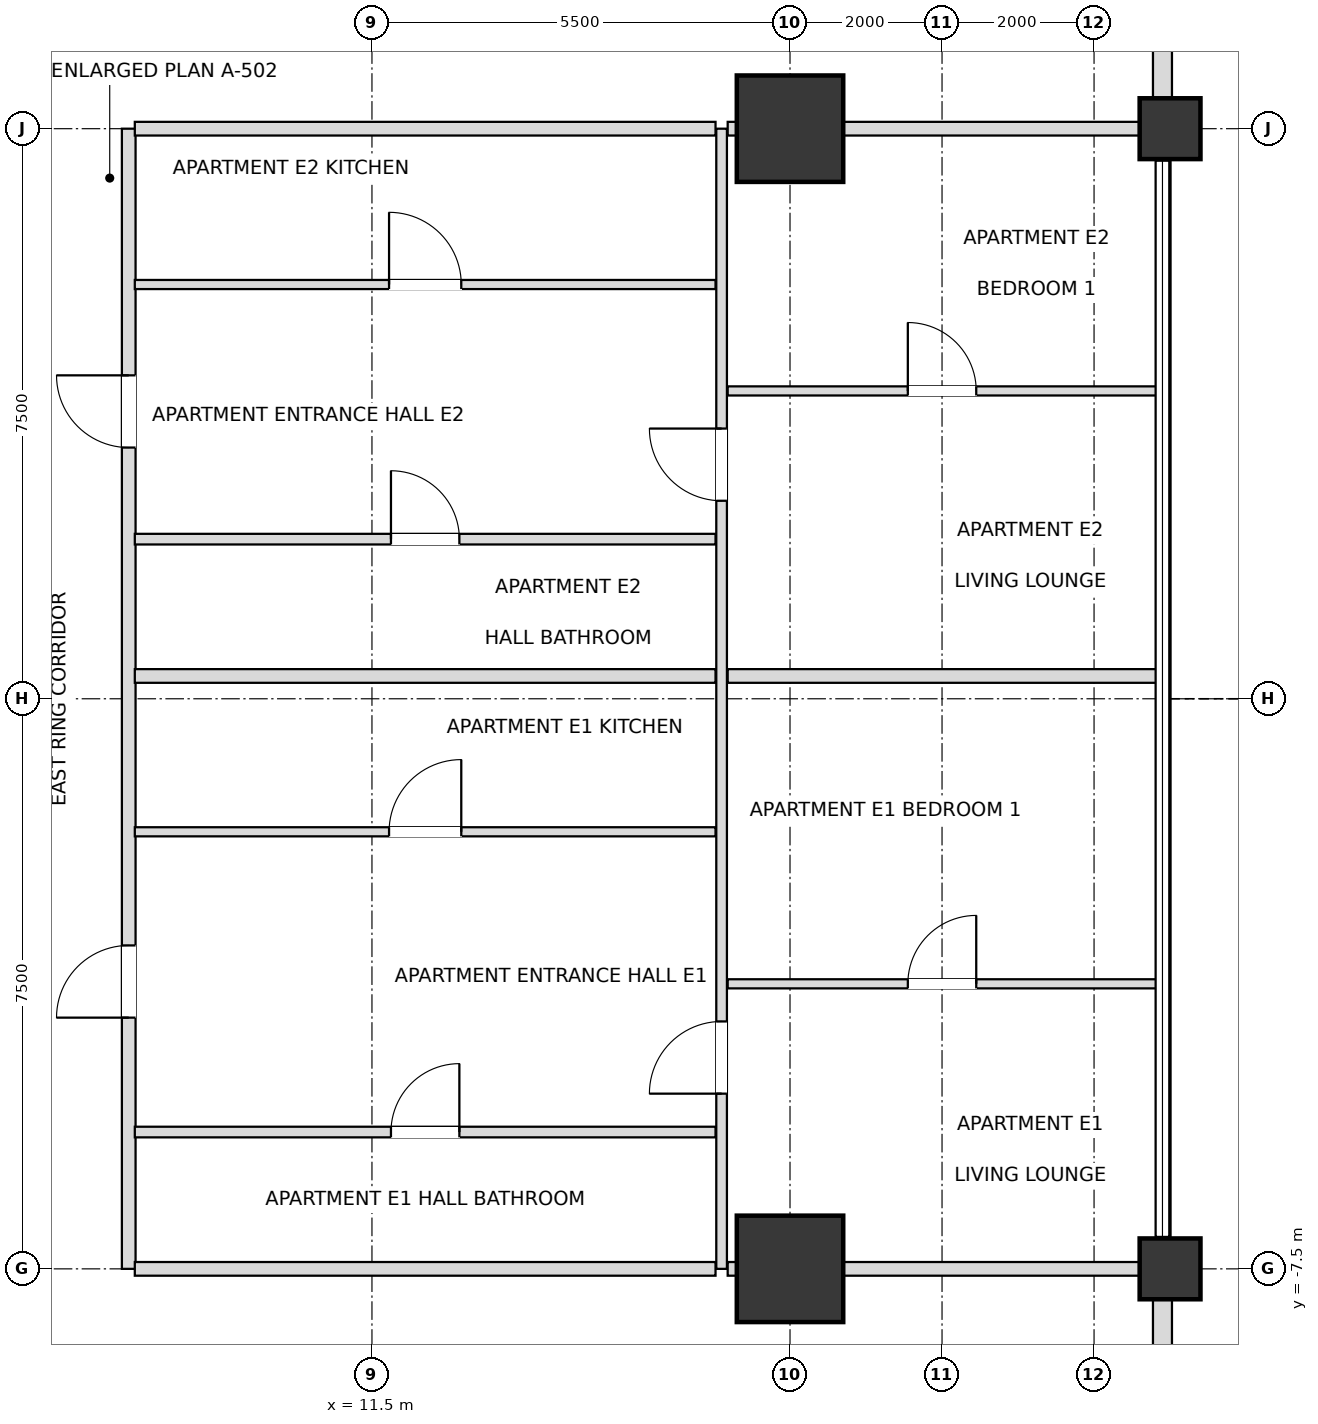
"""IFC4 building model, lengths in metres.
Left out: names, types, materials, properties, quantities, classifications, styles, units other than length and angle.
Written with IfcOpenShell. Run it as: python <this file> out.ifc"""

import sys

from ifc_helpers import new_model, si_unit, direction, frame, frame_2d, origin, origin_2d, place, context, subcontext, project, spatial, rectangle, extrude, element, fill, save


model = new_model("IFC4")
c1 = context("Model", 3, precision=1e-05, world=origin(), true_north=direction((0.0, 1.0)))
c2 = subcontext(c1, "Body", "Model", "MODEL_VIEW")
j1 = project(units=[si_unit("LENGTHUNIT", "METRE"), si_unit("PLANEANGLEUNIT", "RADIAN")], contexts=[c1])
p1 = place(None, origin())
s1 = spatial("IfcSite", under=j1, at=p1, CompositionType="ELEMENT")
p2 = place(p1, origin())
s2 = spatial("IfcBuilding", under=s1, at=p2, CompositionType="ELEMENT")
p3 = place(p2, frame((0.0, 0.0, 72.0)))
s3 = spatial("IfcBuildingStorey", under=s2, at=p3, CompositionType="ELEMENT", Elevation=72.0)
for number, where, z_axis, x_axis in (
    (1, (17.0, -7.5, 0.0), (0.0, 0.0, 1.0), (1.0, 0.0, 0.0)),
    (2, (17.0, 7.5, 0.0), (0.0, 0.0, 1.0), (1.0, 0.0, 0.0)),
):
    element("IfcColumn", number, at=place(p3, frame(where, z_axis=z_axis, x_axis=x_axis)), inside=s3, PredefinedType="USERDEFINED", context=c2, shape_type="SweptSolid", body=[
        extrude(rectangle(XDim=1.4, YDim=1.4, at=origin_2d()), origin(), (0.0, 0.0, 1.0), 3.6),
    ])
for number, where, z_axis, x_axis in (
    (3, (22.0, -7.5, 0.0), (0.0, 0.0, 1.0), (1.0, 0.0, 0.0)),
    (4, (22.0, 7.5, 0.0), (0.0, 0.0, 1.0), (1.0, 0.0, 0.0)),
):
    element("IfcColumn", number, at=place(p3, frame(where, z_axis=z_axis, x_axis=x_axis)), inside=s3, PredefinedType="COLUMN", context=c2, shape_type="SweptSolid", body=[
        extrude(rectangle(XDim=0.8, YDim=0.8, at=origin_2d()), origin(), (0.0, 0.0, 1.0), 3.6),
    ])
p4 = place(p3, frame((21.9, -12.605, 0.0), z_axis=(0.0, 0.0, 1.0), x_axis=(0.0, 1.0, 0.0)))
e5 = element("IfcWall", 5, at=p4, inside=s3, PredefinedType="SOLIDWALL", context=c2, shape_type="SweptSolid", body=[
    extrude(rectangle(XDim=4.71, YDim=0.25, at=frame_2d((2.355, 0.0))), origin(), (0.0, 0.0, 1.0), 2.736),
])
p5 = place(p4, frame((1.455, 0.0, 0.72)))
e6 = element("IfcOpeningElement", 6, at=p5, cuts=e5, PredefinedType="OPENING", context=c2, shape_type="SweptSolid", body=[
    extrude(rectangle(XDim=1.8, YDim=1.68, at=frame_2d((0.9, 0.84))), frame((0.0, 0.135, 0.0), z_axis=(0.0, -1.0, 0.0), x_axis=(1.0, 0.0, 0.0)), (0.0, 0.0, 1.0), 0.27),
])
p6 = place(p3, frame((21.9, 7.895, 0.0), z_axis=(0.0, 0.0, 1.0), x_axis=(0.0, 1.0, 0.0)))
e7 = element("IfcWall", 7, at=p6, inside=s3, PredefinedType="SOLIDWALL", context=c2, shape_type="SweptSolid", body=[
    extrude(rectangle(XDim=4.71, YDim=0.25, at=frame_2d((2.355, 0.0))), origin(), (0.0, 0.0, 1.0), 2.736),
])
p7 = place(p6, frame((1.455, 0.0, 0.72)))
e8 = element("IfcOpeningElement", 8, at=p7, cuts=e7, PredefinedType="OPENING", context=c2, shape_type="SweptSolid", body=[
    extrude(rectangle(XDim=1.8, YDim=1.68, at=frame_2d((0.9, 0.84))), frame((0.0, 0.135, 0.0), z_axis=(0.0, -1.0, 0.0), x_axis=(1.0, 0.0, 0.0)), (0.0, 0.0, 1.0), 0.27),
])
p8 = place(p3, frame((8.3, -7.5, 0.0), z_axis=(0.0, 0.0, 1.0), x_axis=(0.0, 1.0, 0.0)))
e9 = element("IfcWall", 9, at=p8, inside=s3, PredefinedType="PARTITIONING", context=c2, shape_type="SweptSolid", body=[
    extrude(rectangle(XDim=15.0, YDim=0.18, at=frame_2d((7.5, 0.0))), origin(), (0.0, 0.0, 1.0), 3.38),
])
p9 = place(p8, frame((3.305, 0.0, 0.0)))
e10 = element("IfcOpeningElement", 10, at=p9, cuts=e9, PredefinedType="OPENING", context=c2, shape_type="SweptSolid", body=[
    extrude(rectangle(XDim=0.95, YDim=2.15, at=frame_2d((0.475, 1.075))), frame((0.0, 0.1, 0.0), z_axis=(0.0, -1.0, 0.0), x_axis=(1.0, 0.0, 0.0)), (0.0, 0.0, 1.0), 0.2),
])
p10 = place(p8, frame((10.805, 0.0, 0.0)))
e11 = element("IfcOpeningElement", 11, at=p10, cuts=e9, PredefinedType="OPENING", context=c2, shape_type="SweptSolid", body=[
    extrude(rectangle(XDim=0.95, YDim=2.15, at=frame_2d((0.475, 1.075))), frame((0.0, 0.1, 0.0), z_axis=(0.0, -1.0, 0.0), x_axis=(1.0, 0.0, 0.0)), (0.0, 0.0, 1.0), 0.2),
])
p11 = place(p3, frame((16.1, -7.5, 0.0), z_axis=(0.0, 0.0, 1.0), x_axis=(0.0, 1.0, 0.0)))
e12 = element("IfcWall", 12, at=p11, inside=s3, PredefinedType="PARTITIONING", context=c2, shape_type="SweptSolid", body=[
    extrude(rectangle(XDim=15.0, YDim=0.14, at=frame_2d((7.5, 0.0))), origin(), (0.0, 0.0, 1.0), 3.38),
])
p12 = place(p11, frame((2.305, 0.0, 0.0)))
e13 = element("IfcOpeningElement", 13, at=p12, cuts=e12, PredefinedType="OPENING", context=c2, shape_type="SweptSolid", body=[
    extrude(rectangle(XDim=0.95, YDim=2.1, at=frame_2d((0.475, 1.05))), frame((0.0, 0.08, 0.0), z_axis=(0.0, -1.0, 0.0), x_axis=(1.0, 0.0, 0.0)), (0.0, 0.0, 1.0), 0.16),
])
p13 = place(p11, frame((10.105, 0.0, 0.0)))
e14 = element("IfcOpeningElement", 14, at=p13, cuts=e12, PredefinedType="OPENING", context=c2, shape_type="SweptSolid", body=[
    extrude(rectangle(XDim=0.95, YDim=2.1, at=frame_2d((0.475, 1.05))), frame((0.0, 0.08, 0.0), z_axis=(0.0, -1.0, 0.0), x_axis=(1.0, 0.0, 0.0)), (0.0, 0.0, 1.0), 0.16),
])
p14 = place(p3, frame((8.38, -7.5, 0.0), z_axis=(0.0, 0.0, 1.0), x_axis=(1.0, 0.0, 0.0)))
e15 = element("IfcWall", 15, at=p14, inside=s3, PredefinedType="PARTITIONING", context=c2, shape_type="SweptSolid", body=[
    extrude(rectangle(XDim=7.64, YDim=0.18, at=frame_2d((3.82, 0.0))), origin(), (0.0, 0.0, 1.0), 2.816),
])
p15 = place(p3, frame((16.18, -7.5, 0.0), z_axis=(0.0, 0.0, 1.0), x_axis=(1.0, 0.0, 0.0)))
e16 = element("IfcWall", 16, at=p15, inside=s3, PredefinedType="PARTITIONING", context=c2, shape_type="SweptSolid", body=[
    extrude(rectangle(XDim=5.72, YDim=0.18, at=frame_2d((2.86, 0.0))), origin(), (0.0, 0.0, 1.0), 2.816),
])
p16 = place(p3, frame((8.38, -5.7, 0.0), z_axis=(0.0, 0.0, 1.0), x_axis=(1.0, 0.0, 0.0)))
e17 = element("IfcWall", 17, at=p16, inside=s3, PredefinedType="PARTITIONING", context=c2, shape_type="SweptSolid", body=[
    extrude(rectangle(XDim=7.64, YDim=0.14, at=frame_2d((3.82, 0.0))), origin(), (0.0, 0.0, 1.0), 2.948),
])
p17 = place(p16, frame((3.37, 0.0, 0.0)))
e18 = element("IfcOpeningElement", 18, at=p17, cuts=e17, PredefinedType="OPENING", context=c2, shape_type="SweptSolid", body=[
    extrude(rectangle(XDim=0.9, YDim=2.1, at=frame_2d((0.45, 1.05))), frame((0.0, 0.08, 0.0), z_axis=(0.0, -1.0, 0.0), x_axis=(1.0, 0.0, 0.0)), (0.0, 0.0, 1.0), 0.16),
])
p18 = place(p3, frame((16.18, -3.75, 0.0), z_axis=(0.0, 0.0, 1.0), x_axis=(1.0, 0.0, 0.0)))
e19 = element("IfcWall", 19, at=p18, inside=s3, PredefinedType="PARTITIONING", context=c2, shape_type="SweptSolid", body=[
    extrude(rectangle(XDim=5.64, YDim=0.12, at=frame_2d((2.82, 0.0))), origin(), (0.0, 0.0, 1.0), 2.816),
])
p19 = place(p18, frame((2.37, 0.0, 0.0)))
e20 = element("IfcOpeningElement", 20, at=p19, cuts=e19, PredefinedType="OPENING", context=c2, shape_type="SweptSolid", body=[
    extrude(rectangle(XDim=0.9, YDim=2.1, at=frame_2d((0.45, 1.05))), frame((0.0, 0.07, 0.0), z_axis=(0.0, -1.0, 0.0), x_axis=(1.0, 0.0, 0.0)), (0.0, 0.0, 1.0), 0.14),
])
p20 = place(p3, frame((8.38, -1.75, 0.0), z_axis=(0.0, 0.0, 1.0), x_axis=(1.0, 0.0, 0.0)))
e21 = element("IfcWall", 21, at=p20, inside=s3, PredefinedType="PARTITIONING", context=c2, shape_type="SweptSolid", body=[
    extrude(rectangle(XDim=7.64, YDim=0.12, at=frame_2d((3.82, 0.0))), origin(), (0.0, 0.0, 1.0), 2.948),
])
p21 = place(p20, frame((3.345, 0.0, 0.0)))
e22 = element("IfcOpeningElement", 22, at=p21, cuts=e21, PredefinedType="OPENING", context=c2, shape_type="SweptSolid", body=[
    extrude(rectangle(XDim=0.95, YDim=2.1, at=frame_2d((0.475, 1.05))), frame((0.0, 0.07, 0.0), z_axis=(0.0, -1.0, 0.0), x_axis=(1.0, 0.0, 0.0)), (0.0, 0.0, 1.0), 0.14),
])
p22 = place(p3, frame((8.38, 0.3, 0.0), z_axis=(0.0, 0.0, 1.0), x_axis=(1.0, 0.0, 0.0)))
e23 = element("IfcWall", 23, at=p22, inside=s3, PredefinedType="PARTITIONING", context=c2, shape_type="SweptSolid", body=[
    extrude(rectangle(XDim=7.64, YDim=0.18, at=frame_2d((3.82, 0.0))), origin(), (0.0, 0.0, 1.0), 2.948),
])
p23 = place(p3, frame((16.18, 0.3, 0.0), z_axis=(0.0, 0.0, 1.0), x_axis=(1.0, 0.0, 0.0)))
e24 = element("IfcWall", 24, at=p23, inside=s3, PredefinedType="PARTITIONING", context=c2, shape_type="SweptSolid", body=[
    extrude(rectangle(XDim=5.64, YDim=0.18, at=frame_2d((2.82, 0.0))), origin(), (0.0, 0.0, 1.0), 2.816),
])
p24 = place(p3, frame((8.38, 2.1, 0.0), z_axis=(0.0, 0.0, 1.0), x_axis=(1.0, 0.0, 0.0)))
e25 = element("IfcWall", 25, at=p24, inside=s3, PredefinedType="PARTITIONING", context=c2, shape_type="SweptSolid", body=[
    extrude(rectangle(XDim=7.64, YDim=0.14, at=frame_2d((3.82, 0.0))), origin(), (0.0, 0.0, 1.0), 2.948),
])
p25 = place(p24, frame((3.37, 0.0, 0.0)))
e26 = element("IfcOpeningElement", 26, at=p25, cuts=e25, PredefinedType="OPENING", context=c2, shape_type="SweptSolid", body=[
    extrude(rectangle(XDim=0.9, YDim=2.1, at=frame_2d((0.45, 1.05))), frame((0.0, 0.08, 0.0), z_axis=(0.0, -1.0, 0.0), x_axis=(1.0, 0.0, 0.0)), (0.0, 0.0, 1.0), 0.16),
])
p26 = place(p3, frame((16.18, 4.05, 0.0), z_axis=(0.0, 0.0, 1.0), x_axis=(1.0, 0.0, 0.0)))
e27 = element("IfcWall", 27, at=p26, inside=s3, PredefinedType="PARTITIONING", context=c2, shape_type="SweptSolid", body=[
    extrude(rectangle(XDim=5.64, YDim=0.12, at=frame_2d((2.82, 0.0))), origin(), (0.0, 0.0, 1.0), 2.816),
])
p27 = place(p26, frame((2.37, 0.0, 0.0)))
e28 = element("IfcOpeningElement", 28, at=p27, cuts=e27, PredefinedType="OPENING", context=c2, shape_type="SweptSolid", body=[
    extrude(rectangle(XDim=0.9, YDim=2.1, at=frame_2d((0.45, 1.05))), frame((0.0, 0.07, 0.0), z_axis=(0.0, -1.0, 0.0), x_axis=(1.0, 0.0, 0.0)), (0.0, 0.0, 1.0), 0.14),
])
p28 = place(p3, frame((8.38, 5.45, 0.0), z_axis=(0.0, 0.0, 1.0), x_axis=(1.0, 0.0, 0.0)))
e29 = element("IfcWall", 29, at=p28, inside=s3, PredefinedType="PARTITIONING", context=c2, shape_type="SweptSolid", body=[
    extrude(rectangle(XDim=7.64, YDim=0.12, at=frame_2d((3.82, 0.0))), origin(), (0.0, 0.0, 1.0), 2.948),
])
p29 = place(p28, frame((3.345, 0.0, 0.0)))
e30 = element("IfcOpeningElement", 30, at=p29, cuts=e29, PredefinedType="OPENING", context=c2, shape_type="SweptSolid", body=[
    extrude(rectangle(XDim=0.95, YDim=2.1, at=frame_2d((0.475, 1.05))), frame((0.0, 0.07, 0.0), z_axis=(0.0, -1.0, 0.0), x_axis=(1.0, 0.0, 0.0)), (0.0, 0.0, 1.0), 0.14),
])
p30 = place(p3, frame((8.38, 7.5, 0.0), z_axis=(0.0, 0.0, 1.0), x_axis=(1.0, 0.0, 0.0)))
e31 = element("IfcWall", 31, at=p30, inside=s3, PredefinedType="PARTITIONING", context=c2, shape_type="SweptSolid", body=[
    extrude(rectangle(XDim=7.64, YDim=0.18, at=frame_2d((3.82, 0.0))), origin(), (0.0, 0.0, 1.0), 2.816),
])
p31 = place(p3, frame((16.18, 7.5, 0.0), z_axis=(0.0, 0.0, 1.0), x_axis=(1.0, 0.0, 0.0)))
e32 = element("IfcWall", 32, at=p31, inside=s3, PredefinedType="PARTITIONING", context=c2, shape_type="SweptSolid", body=[
    extrude(rectangle(XDim=5.72, YDim=0.18, at=frame_2d((2.86, 0.0))), origin(), (0.0, 0.0, 1.0), 2.816),
])
p32 = place(p17, origin())
e33 = element("IfcDoor", 33, at=p32, inside=s3, OperationType="SINGLE_SWING_RIGHT", PredefinedType="DOOR", context=c2, shape_type="SweptSolid", body=[
    extrude(rectangle(XDim=0.9, YDim=2.1, at=frame_2d((0.45, 1.05))), frame((0.0, 0.025, 0.0), z_axis=(0.0, -1.0, 0.0), x_axis=(1.0, 0.0, 0.0)), (0.0, 0.0, 1.0), 0.05),
])
fill(e18, e33)
p33 = place(p9, origin())
e34 = element("IfcDoor", 34, at=p33, inside=s3, OperationType="SINGLE_SWING_LEFT", PredefinedType="DOOR", context=c2, shape_type="SweptSolid", body=[
    extrude(rectangle(XDim=0.95, YDim=2.15, at=frame_2d((0.475, 1.075))), frame((0.0, 0.025, 0.0), z_axis=(0.0, -1.0, 0.0), x_axis=(1.0, 0.0, 0.0)), (0.0, 0.0, 1.0), 0.05),
])
fill(e10, e34)
p34 = place(p21, origin())
e35 = element("IfcDoor", 35, at=p34, inside=s3, OperationType="SINGLE_SWING_RIGHT", PredefinedType="DOOR", context=c2, shape_type="SweptSolid", body=[
    extrude(rectangle(XDim=0.95, YDim=2.1, at=frame_2d((0.475, 1.05))), frame((0.0, 0.025, 0.0), z_axis=(0.0, -1.0, 0.0), x_axis=(1.0, 0.0, 0.0)), (0.0, 0.0, 1.0), 0.05),
])
fill(e22, e35)
p35 = place(p12, origin())
e36 = element("IfcDoor", 36, at=p35, inside=s3, OperationType="SINGLE_SWING_LEFT", PredefinedType="DOOR", context=c2, shape_type="SweptSolid", body=[
    extrude(rectangle(XDim=0.95, YDim=2.1, at=frame_2d((0.475, 1.05))), frame((0.0, 0.025, 0.0), z_axis=(0.0, -1.0, 0.0), x_axis=(1.0, 0.0, 0.0)), (0.0, 0.0, 1.0), 0.05),
])
fill(e13, e36)
p36 = place(p19, origin())
e37 = element("IfcDoor", 37, at=p36, inside=s3, OperationType="SINGLE_SWING_RIGHT", PredefinedType="DOOR", context=c2, shape_type="SweptSolid", body=[
    extrude(rectangle(XDim=0.9, YDim=2.1, at=frame_2d((0.45, 1.05))), frame((0.0, 0.025, 0.0), z_axis=(0.0, -1.0, 0.0), x_axis=(1.0, 0.0, 0.0)), (0.0, 0.0, 1.0), 0.05),
])
fill(e20, e37)
p37 = place(p25, origin())
e38 = element("IfcDoor", 38, at=p37, inside=s3, OperationType="SINGLE_SWING_LEFT", PredefinedType="DOOR", context=c2, shape_type="SweptSolid", body=[
    extrude(rectangle(XDim=0.9, YDim=2.1, at=frame_2d((0.45, 1.05))), frame((0.0, 0.025, 0.0), z_axis=(0.0, -1.0, 0.0), x_axis=(1.0, 0.0, 0.0)), (0.0, 0.0, 1.0), 0.05),
])
fill(e26, e38)
p38 = place(p10, origin())
e39 = element("IfcDoor", 39, at=p38, inside=s3, OperationType="SINGLE_SWING_RIGHT", PredefinedType="DOOR", context=c2, shape_type="SweptSolid", body=[
    extrude(rectangle(XDim=0.95, YDim=2.15, at=frame_2d((0.475, 1.075))), frame((0.0, 0.025, 0.0), z_axis=(0.0, -1.0, 0.0), x_axis=(1.0, 0.0, 0.0)), (0.0, 0.0, 1.0), 0.05),
])
fill(e11, e39)
p39 = place(p29, origin())
e40 = element("IfcDoor", 40, at=p39, inside=s3, OperationType="SINGLE_SWING_LEFT", PredefinedType="DOOR", context=c2, shape_type="SweptSolid", body=[
    extrude(rectangle(XDim=0.95, YDim=2.1, at=frame_2d((0.475, 1.05))), frame((0.0, 0.025, 0.0), z_axis=(0.0, -1.0, 0.0), x_axis=(1.0, 0.0, 0.0)), (0.0, 0.0, 1.0), 0.05),
])
fill(e30, e40)
p40 = place(p13, origin())
e41 = element("IfcDoor", 41, at=p40, inside=s3, OperationType="SINGLE_SWING_RIGHT", PredefinedType="DOOR", context=c2, shape_type="SweptSolid", body=[
    extrude(rectangle(XDim=0.95, YDim=2.1, at=frame_2d((0.475, 1.05))), frame((0.0, 0.025, 0.0), z_axis=(0.0, -1.0, 0.0), x_axis=(1.0, 0.0, 0.0)), (0.0, 0.0, 1.0), 0.05),
])
fill(e14, e41)
p41 = place(p27, origin())
e42 = element("IfcDoor", 42, at=p41, inside=s3, OperationType="SINGLE_SWING_LEFT", PredefinedType="DOOR", context=c2, shape_type="SweptSolid", body=[
    extrude(rectangle(XDim=0.9, YDim=2.1, at=frame_2d((0.45, 1.05))), frame((0.0, 0.025, 0.0), z_axis=(0.0, -1.0, 0.0), x_axis=(1.0, 0.0, 0.0)), (0.0, 0.0, 1.0), 0.05),
])
fill(e28, e42)
save(model, sys.argv[1])
